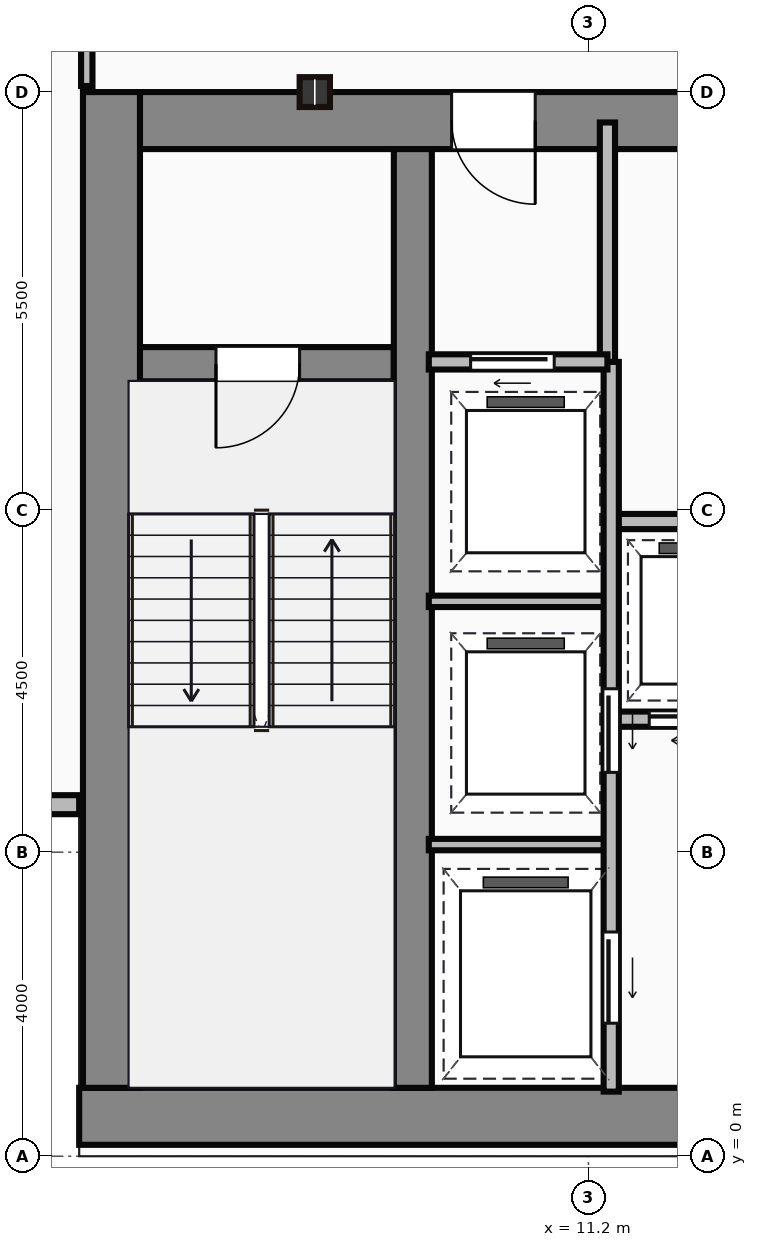
"""IFC4 building model, lengths in metres.
Left out: names, types, materials, properties, quantities, classifications, styles, units other than length and angle.
Written with IfcOpenShell. Run it as: python <this file> out.ifc"""

import sys

from ifc_helpers import new_model, si_unit, direction, frame, frame_2d, origin, origin_2d, place, context, subcontext, project, spatial, rectangle, i_section, extrude, source, transform, mapped, element, fill, save


model = new_model("IFC4")
c1 = context("Model", 3, precision=1e-05, world=origin(), true_north=direction((0.0, 1.0)))
c2 = subcontext(c1, "Body", "Model", "MODEL_VIEW")
j1 = project(units=[si_unit("LENGTHUNIT", "METRE"), si_unit("PLANEANGLEUNIT", "RADIAN")], contexts=[c1])
p1 = place(None, origin())
s1 = spatial("IfcSite", under=j1, at=p1, CompositionType="ELEMENT")
p2 = place(p1, origin())
s2 = spatial("IfcBuilding", under=s1, at=p2, CompositionType="ELEMENT")
p3 = place(p2, frame((0.0, 0.0, 99.6)))
s3 = spatial("IfcBuildingStorey", under=s2, at=p3, CompositionType="ELEMENT", Elevation=99.6)
m1 = source(origin(), c2, "Body", "SweptSolid", [
    extrude(rectangle(XDim=29.5, YDim=0.75, at=frame_2d((14.75, 0.0))), origin(), (0.0, 0.0, 1.0), 3.65),
])
p4 = place(p3, frame((4.5, 0.525, 0.0), z_axis=(0.0, 0.0, 1.0), x_axis=(1.0, 0.0, 0.0)))
e1 = element("IfcWall", 1, at=p4, inside=s3, PredefinedType="SHEAR", context=c2, shape_type="MappedRepresentation", body=[
    mapped(m1, transform((0.0, 0.0, 0.0))),
])
m2 = source(origin(), c2, "Body", "SweptSolid", [
    extrude(rectangle(XDim=13.1, YDim=0.75, at=frame_2d((6.55, 0.0))), origin(), (0.0, 0.0, 1.0), 3.65),
])
p5 = place(p3, frame((4.925, 0.9, 0.0), z_axis=(0.0, 0.0, 1.0), x_axis=(0.0, 1.0, 0.0)))
e2 = element("IfcWall", 2, at=p5, inside=s3, PredefinedType="SHEAR", context=c2, shape_type="MappedRepresentation", body=[
    mapped(m2, transform((0.0, 0.0, 0.0))),
])
m3 = source(origin(), c2, "Body", "SweptSolid", [
    extrude(rectangle(XDim=9.1, YDim=0.75, at=frame_2d((4.55, 0.0))), origin(), (0.0, 0.0, 1.0), 3.65),
])
p6 = place(p3, frame((5.3, 13.625, 0.0), z_axis=(0.0, 0.0, 1.0), x_axis=(1.0, 0.0, 0.0)))
e3 = element("IfcWall", 3, at=p6, inside=s3, PredefinedType="SHEAR", context=c2, shape_type="MappedRepresentation", body=[
    mapped(m3, transform((0.0, 0.0, 0.0))),
])
p7 = place(p6, frame((4.1, 0.0, 0.0)))
e4 = element("IfcOpeningElement", 4, at=p7, cuts=e3, PredefinedType="OPENING", context=c2, shape_type="SweptSolid", body=[
    extrude(rectangle(XDim=1.1, YDim=2.15, at=frame_2d((0.55, 1.075))), frame((0.0, 0.385, 0.0), z_axis=(0.0, -1.0, 0.0), x_axis=(1.0, 0.0, 0.0)), (0.0, 0.0, 1.0), 0.77),
])
m4 = source(origin(), c2, "Body", "SweptSolid", [
    extrude(rectangle(XDim=12.35, YDim=0.5, at=frame_2d((6.175, 0.0))), origin(), (0.0, 0.0, 1.0), 3.65),
])
p8 = place(p3, frame((8.89, 0.9, 0.0), z_axis=(0.0, 0.0, 1.0), x_axis=(0.0, 1.0, 0.0)))
e5 = element("IfcWall", 5, at=p8, inside=s3, PredefinedType="SHEAR", context=c2, shape_type="MappedRepresentation", body=[
    mapped(m4, transform((0.0, 0.0, 0.0))),
])
m5 = source(origin(), c2, "Body", "SweptSolid", [
    extrude(rectangle(XDim=3.39, YDim=0.45, at=frame_2d((1.695, 0.0))), origin(), (0.0, 0.0, 1.0), 3.65),
])
p9 = place(p3, frame((5.25, 10.42, 0.0), z_axis=(0.0, 0.0, 1.0), x_axis=(1.0, 0.0, 0.0)))
e6 = element("IfcWall", 6, at=p9, inside=s3, PredefinedType="SHEAR", context=c2, shape_type="MappedRepresentation", body=[
    mapped(m5, transform((0.0, 0.0, 0.0))),
])
p10 = place(p9, frame((1.05, 0.0, 0.0)))
e7 = element("IfcOpeningElement", 7, at=p10, cuts=e6, PredefinedType="OPENING", context=c2, shape_type="SweptSolid", body=[
    extrude(rectangle(XDim=1.1, YDim=2.15, at=frame_2d((0.55, 1.075))), frame((0.0, 0.235, 0.0), z_axis=(0.0, -1.0, 0.0), x_axis=(1.0, 0.0, 0.0)), (0.0, 0.0, 1.0), 0.47),
])
m6 = source(origin(), c2, "Body", "SweptSolid", [
    extrude(i_section(OverallWidth=0.399, OverallDepth=0.393, WebThickness=0.023, FlangeThickness=0.037, at=origin_2d()), origin(), (0.0, 0.0, 1.0), 3.65),
])
p11 = place(p3, frame((7.6, 14.0, 0.0), z_axis=(0.0, 0.0, 1.0), x_axis=(1.0, 0.0, 0.0)))
e8 = element("IfcColumn", 8, at=p11, inside=s3, PredefinedType="COLUMN", context=c2, shape_type="MappedRepresentation", body=[
    mapped(m6, transform((0.0, 0.0, 0.0))),
])
m7 = source(origin(), c2, "Body", "SweptSolid", [
    extrude(rectangle(XDim=4.5, YDim=0.25, at=frame_2d((2.25, 0.0))), origin(), (0.0, 0.0, 1.0), 3.4),
])
p12 = place(p3, frame((0.0, 4.625, 0.0), z_axis=(0.0, 0.0, 1.0), x_axis=(1.0, 0.0, 0.0)))
e9 = element("IfcWall", 9, at=p12, inside=s3, PredefinedType="STANDARD", context=c2, shape_type="MappedRepresentation", body=[
    mapped(m7, transform((0.0, 0.0, 0.0))),
])
m8 = source(origin(), c2, "Body", "SweptSolid", [
    extrude(rectangle(XDim=3.18, YDim=0.2, at=frame_2d((1.59, 0.0))), origin(), (0.0, 0.0, 1.0), 3.4),
])
p13 = place(p3, frame((11.45, 10.42, 0.0), z_axis=(0.0, 0.0, 1.0), x_axis=(0.0, 1.0, 0.0)))
e10 = element("IfcWall", 10, at=p13, inside=s3, PredefinedType="PARTITIONING", context=c2, shape_type="MappedRepresentation", body=[
    mapped(m8, transform((0.0, 0.0, 0.0))),
])
m9 = source(origin(), c2, "Body", "SweptSolid", [
    extrude(rectangle(XDim=2.35, YDim=0.2, at=frame_2d((1.175, 0.0))), origin(), (0.0, 0.0, 1.0), 3.4),
])
p14 = place(p3, frame((9.1, 10.45, 0.0), z_axis=(0.0, 0.0, 1.0), x_axis=(1.0, 0.0, 0.0)))
e11 = element("IfcWall", 11, at=p14, inside=s3, PredefinedType="PARTITIONING", context=c2, shape_type="MappedRepresentation", body=[
    mapped(m9, transform((0.0, 0.0, 0.0))),
])
p15 = place(p14, frame((0.55, 0.0, 0.0)))
e12 = element("IfcOpeningElement", 12, at=p15, cuts=e11, PredefinedType="OPENING", context=c2, shape_type="SweptSolid", body=[
    extrude(rectangle(XDim=1.1, YDim=2.15, at=frame_2d((0.55, 1.075))), frame((0.0, 0.11, 0.0), z_axis=(0.0, -1.0, 0.0), x_axis=(1.0, 0.0, 0.0)), (0.0, 0.0, 1.0), 0.22),
])
m10 = source(origin(), c2, "Body", "SweptSolid", [
    extrude(rectangle(XDim=9.6, YDim=0.2, at=frame_2d((4.8, 0.0))), origin(), (0.0, 0.0, 1.0), 3.4),
])
p16 = place(p3, frame((11.5, 0.85, 0.0), z_axis=(0.0, 0.0, 1.0), x_axis=(0.0, 1.0, 0.0)))
e13 = element("IfcWall", 13, at=p16, inside=s3, PredefinedType="PARTITIONING", context=c2, shape_type="MappedRepresentation", body=[
    mapped(m10, transform((0.0, 0.0, 0.0))),
])
p17 = place(p16, frame((4.2, 0.0, 0.0)))
e14 = element("IfcOpeningElement", 14, at=p17, cuts=e13, PredefinedType="OPENING", context=c2, shape_type="SweptSolid", body=[
    extrude(rectangle(XDim=1.1, YDim=2.15, at=frame_2d((0.55, 1.075))), frame((0.0, 0.11, 0.0), z_axis=(0.0, -1.0, 0.0), x_axis=(1.0, 0.0, 0.0)), (0.0, 0.0, 1.0), 0.22),
])
p18 = place(p16, frame((0.9, 0.0, 0.0)))
e15 = element("IfcOpeningElement", 15, at=p18, cuts=e13, PredefinedType="OPENING", context=c2, shape_type="SweptSolid", body=[
    extrude(rectangle(XDim=1.2, YDim=2.15, at=frame_2d((0.6, 1.075))), frame((0.0, 0.11, 0.0), z_axis=(0.0, -1.0, 0.0), x_axis=(1.0, 0.0, 0.0)), (0.0, 0.0, 1.0), 0.22),
])
m11 = source(origin(), c2, "Body", "SweptSolid", [
    extrude(rectangle(XDim=2.4, YDim=0.15, at=frame_2d((1.2, 0.0))), origin(), (0.0, 0.0, 1.0), 3.4),
])
for number, where, z_axis, x_axis in (
    (16, (9.1, 4.1, 0.0), (0.0, 0.0, 1.0), (1.0, 0.0, 0.0)),
    (17, (9.1, 7.3, 0.0), (0.0, 0.0, 1.0), (1.0, 0.0, 0.0)),
):
    element("IfcWall", number, at=place(p3, frame(where, z_axis=z_axis, x_axis=x_axis)), inside=s3, PredefinedType="PARTITIONING", context=c2, shape_type="MappedRepresentation", body=[
        mapped(m11, transform((0.0, 0.0, 0.0))),
    ])
m12 = source(origin(), c2, "Body", "SweptSolid", [
    extrude(rectangle(XDim=11.85, YDim=0.2, at=frame_2d((5.925, 0.0))), origin(), (0.0, 0.0, 1.0), 3.4),
])
p19 = place(p3, frame((11.55, 5.75, 0.0), z_axis=(0.0, 0.0, 1.0), x_axis=(1.0, 0.0, 0.0)))
e18 = element("IfcWall", 18, at=p19, inside=s3, PredefinedType="PARTITIONING", context=c2, shape_type="MappedRepresentation", body=[
    mapped(m12, transform((0.0, 0.0, 0.0))),
])
p20 = place(p19, frame((0.45, 0.0, 0.0)))
e19 = element("IfcOpeningElement", 19, at=p20, cuts=e18, PredefinedType="OPENING", context=c2, shape_type="SweptSolid", body=[
    extrude(rectangle(XDim=1.05, YDim=2.15, at=frame_2d((0.525, 1.075))), frame((0.0, 0.11, 0.0), z_axis=(0.0, -1.0, 0.0), x_axis=(1.0, 0.0, 0.0)), (0.0, 0.0, 1.0), 0.22),
])
p21 = place(p19, frame((2.4, 0.0, 0.0)))
e20 = element("IfcOpeningElement", 20, at=p21, cuts=e18, PredefinedType="OPENING", context=c2, shape_type="SweptSolid", body=[
    extrude(rectangle(XDim=1.05, YDim=2.15, at=frame_2d((0.525, 1.075))), frame((0.0, 0.11, 0.0), z_axis=(0.0, -1.0, 0.0), x_axis=(1.0, 0.0, 0.0)), (0.0, 0.0, 1.0), 0.22),
])
p22 = place(p19, frame((4.35, 0.0, 0.0)))
e21 = element("IfcOpeningElement", 21, at=p22, cuts=e18, PredefinedType="OPENING", context=c2, shape_type="SweptSolid", body=[
    extrude(rectangle(XDim=1.05, YDim=2.15, at=frame_2d((0.525, 1.075))), frame((0.0, 0.11, 0.0), z_axis=(0.0, -1.0, 0.0), x_axis=(1.0, 0.0, 0.0)), (0.0, 0.0, 1.0), 0.22),
])
p23 = place(p19, frame((6.3, 0.0, 0.0)))
e22 = element("IfcOpeningElement", 22, at=p23, cuts=e18, PredefinedType="OPENING", context=c2, shape_type="SweptSolid", body=[
    extrude(rectangle(XDim=1.05, YDim=2.15, at=frame_2d((0.525, 1.075))), frame((0.0, 0.11, 0.0), z_axis=(0.0, -1.0, 0.0), x_axis=(1.0, 0.0, 0.0)), (0.0, 0.0, 1.0), 0.22),
])
p24 = place(p19, frame((8.25, 0.0, 0.0)))
e23 = element("IfcOpeningElement", 23, at=p24, cuts=e18, PredefinedType="OPENING", context=c2, shape_type="SweptSolid", body=[
    extrude(rectangle(XDim=1.05, YDim=2.15, at=frame_2d((0.525, 1.075))), frame((0.0, 0.11, 0.0), z_axis=(0.0, -1.0, 0.0), x_axis=(1.0, 0.0, 0.0)), (0.0, 0.0, 1.0), 0.22),
])
p25 = place(p19, frame((10.2, 0.0, 0.0)))
e24 = element("IfcOpeningElement", 24, at=p25, cuts=e18, PredefinedType="OPENING", context=c2, shape_type="SweptSolid", body=[
    extrude(rectangle(XDim=1.05, YDim=2.15, at=frame_2d((0.525, 1.075))), frame((0.0, 0.11, 0.0), z_axis=(0.0, -1.0, 0.0), x_axis=(1.0, 0.0, 0.0)), (0.0, 0.0, 1.0), 0.22),
])
p26 = place(p3, frame((11.55, 8.35, 0.0), z_axis=(0.0, 0.0, 1.0), x_axis=(1.0, 0.0, 0.0)))
e25 = element("IfcWall", 25, at=p26, inside=s3, PredefinedType="PARTITIONING", context=c2, shape_type="MappedRepresentation", body=[
    mapped(m12, transform((0.0, 0.0, 0.0))),
])
m13 = source(origin(), c2, "Body", "SweptSolid", [
    extrude(rectangle(XDim=2.22, YDim=0.15, at=frame_2d((1.11, 0.0))), origin(), (0.0, 0.0, 1.0), 3.4),
])
p27 = place(p3, frame((4.6, 14.08, 0.0), z_axis=(0.0, 0.0, 1.0), x_axis=(0.0, 1.0, 0.0)))
e26 = element("IfcWall", 26, at=p27, inside=s3, PredefinedType="PARTITIONING", context=c2, shape_type="MappedRepresentation", body=[
    mapped(m13, transform((0.0, 0.0, 0.0))),
])
m14 = source(origin(), c2, "Body", "SweptSolid", [
    extrude(rectangle(XDim=1.1, YDim=2.15, at=frame_2d((0.55, 1.075))), frame((0.0, 0.025, 0.0), z_axis=(0.0, -1.0, 0.0), x_axis=(1.0, 0.0, 0.0)), (0.0, 0.0, 1.0), 0.05),
])
p28 = place(p10, frame((1.1, 0.0, 0.0), z_axis=(0.0, 0.0, 1.0), x_axis=(-1.0, 0.0, 0.0)))
e27 = element("IfcDoor", 27, at=p28, inside=s3, OperationType="SINGLE_SWING_LEFT", PredefinedType="DOOR", context=c2, shape_type="MappedRepresentation", body=[
    mapped(m14, transform((0.0, 0.0, 0.0))),
])
fill(e7, e27)
p29 = place(p7, origin())
e28 = element("IfcDoor", 28, at=p29, inside=s3, OperationType="SINGLE_SWING_RIGHT", PredefinedType="DOOR", context=c2, shape_type="MappedRepresentation", body=[
    mapped(m14, transform((0.0, 0.0, 0.0))),
])
fill(e4, e28)
p30 = place(p15, origin())
e29 = element("IfcDoor", 29, at=p30, inside=s3, OperationType="SLIDING_TO_LEFT", PredefinedType="DOOR", context=c2, shape_type="MappedRepresentation", body=[
    mapped(m14, transform((0.0, 0.0, 0.0))),
])
fill(e12, e29)
p31 = place(p17, frame((1.1, 0.0, 0.0), z_axis=(0.0, 0.0, 1.0), x_axis=(-1.0, 0.0, 0.0)))
e30 = element("IfcDoor", 30, at=p31, inside=s3, OperationType="SLIDING_TO_LEFT", PredefinedType="DOOR", context=c2, shape_type="MappedRepresentation", body=[
    mapped(m14, transform((0.0, 0.0, 0.0))),
])
fill(e14, e30)
m15 = source(origin(), c2, "Body", "SweptSolid", [
    extrude(rectangle(XDim=1.2, YDim=2.15, at=frame_2d((0.6, 1.075))), frame((0.0, 0.025, 0.0), z_axis=(0.0, -1.0, 0.0), x_axis=(1.0, 0.0, 0.0)), (0.0, 0.0, 1.0), 0.05),
])
p32 = place(p18, frame((1.2, 0.0, 0.0), z_axis=(0.0, 0.0, 1.0), x_axis=(-1.0, 0.0, 0.0)))
e31 = element("IfcDoor", 31, at=p32, inside=s3, OperationType="SLIDING_TO_LEFT", PredefinedType="DOOR", context=c2, shape_type="MappedRepresentation", body=[
    mapped(m15, transform((0.0, 0.0, 0.0))),
])
fill(e15, e31)
m16 = source(origin(), c2, "Body", "SweptSolid", [
    extrude(rectangle(XDim=1.05, YDim=2.15, at=frame_2d((0.525, 1.075))), frame((0.0, 0.025, 0.0), z_axis=(0.0, -1.0, 0.0), x_axis=(1.0, 0.0, 0.0)), (0.0, 0.0, 1.0), 0.05),
])
p33 = place(p20, frame((1.05, 0.0, 0.0), z_axis=(0.0, 0.0, 1.0), x_axis=(-1.0, 0.0, 0.0)))
e32 = element("IfcDoor", 32, at=p33, inside=s3, OperationType="SLIDING_TO_LEFT", PredefinedType="DOOR", context=c2, shape_type="MappedRepresentation", body=[
    mapped(m16, transform((0.0, 0.0, 0.0))),
])
fill(e19, e32)
save(model, sys.argv[1])
